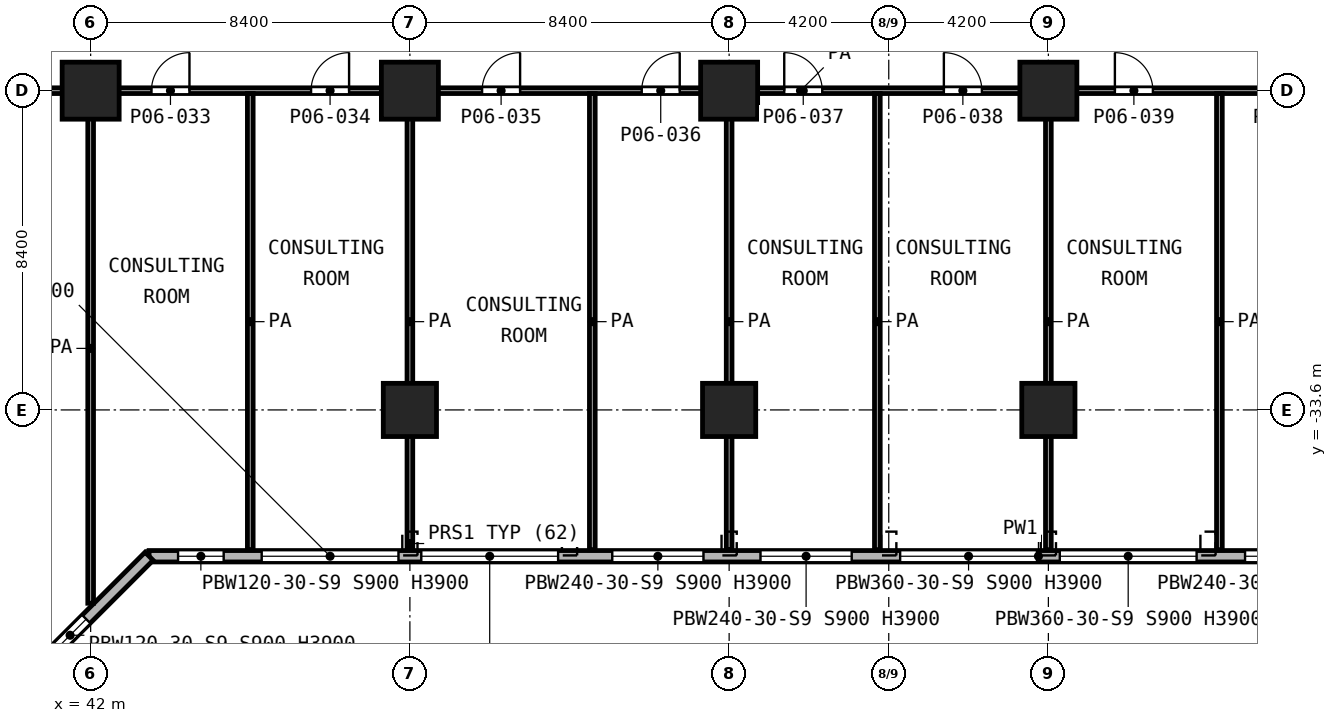
"""IFC4 building model, lengths in metres.
Left out: names, types, materials, properties, quantities, classifications, styles, units other than length and angle.
Written with IfcOpenShell. Run it as: python <this file> out.ifc"""

import sys

from ifc_helpers import new_model, si_unit, direction, frame, frame_2d, origin, origin_2d, place, context, subcontext, project, spatial, rectangle, extrude, element, fill, save


model = new_model("IFC4")
c1 = context("Model", 3, precision=1e-05, world=origin(), true_north=direction((0.0, 1.0)))
c2 = subcontext(c1, "Body", "Model", "MODEL_VIEW")
j1 = project(units=[si_unit("LENGTHUNIT", "METRE"), si_unit("PLANEANGLEUNIT", "RADIAN")], contexts=[c1])
p1 = place(None, origin())
s1 = spatial("IfcSite", under=j1, at=p1, CompositionType="ELEMENT")
p2 = place(p1, origin())
s2 = spatial("IfcBuilding", under=s1, at=p2, CompositionType="ELEMENT")
p3 = place(p2, frame((0.0, 0.0, 29.0)))
s3 = spatial("IfcBuildingStorey", under=s2, at=p3, CompositionType="ELEMENT", Elevation=29.0)
for number, where, z_axis, x_axis in (
    (1, (42.0, -25.2, 0.0), (0.0, 0.0, 1.0), (1.0, 0.0, 0.0)),
    (2, (50.4, -25.2, 0.0), (0.0, 0.0, 1.0), (1.0, 0.0, 0.0)),
    (3, (58.8, -25.2, 0.0), (0.0, 0.0, 1.0), (1.0, 0.0, 0.0)),
    (4, (67.2, -25.2, 0.0), (0.0, 0.0, 1.0), (1.0, 0.0, 0.0)),
):
    element("IfcColumn", number, at=place(p3, frame(where, z_axis=z_axis, x_axis=x_axis)), inside=s3, PredefinedType="COLUMN", context=c2, shape_type="SweptSolid", body=[
        extrude(rectangle(XDim=1.5, YDim=1.5, at=origin_2d()), origin(), (0.0, 0.0, 1.0), 5.2),
    ])
for number, where, z_axis, x_axis in (
    (5, (50.4, -33.6, 0.0), (0.0, 0.0, 1.0), (1.0, 0.0, 0.0)),
    (6, (58.8, -33.6, 0.0), (0.0, 0.0, 1.0), (1.0, 0.0, 0.0)),
    (7, (67.2, -33.6, 0.0), (0.0, 0.0, 1.0), (1.0, 0.0, 0.0)),
):
    element("IfcColumn", number, at=place(p3, frame(where, z_axis=z_axis, x_axis=x_axis)), inside=s3, PredefinedType="COLUMN", context=c2, shape_type="SweptSolid", body=[
        extrude(rectangle(XDim=1.4, YDim=1.4, at=origin_2d()), origin(), (0.0, 0.0, 1.0), 5.2),
    ])
p4 = place(p3, frame((37.45, -43.538, 0.0), z_axis=(0.0, 0.0, 1.0), x_axis=(0.707106781187, 0.707106781187, 0.0)))
e8 = element("IfcWall", 8, at=p4, inside=s3, PredefinedType="SOLIDWALL", context=c2, shape_type="SweptSolid", body=[
    extrude(rectangle(XDim=8.61, YDim=0.3, at=frame_2d((4.305, 0.0))), origin(), (0.0, 0.0, 1.0), 4.7),
])
p5 = place(p4, frame((0.651, 0.0, 0.9)))
e9 = element("IfcOpeningElement", 9, at=p5, cuts=e8, PredefinedType="OPENING", context=c2, shape_type="SweptSolid", body=[
    extrude(rectangle(XDim=2.4, YDim=3.0, at=frame_2d((1.2, 1.5))), frame((0.0, 0.16, 0.0), z_axis=(0.0, -1.0, 0.0), x_axis=(1.0, 0.0, 0.0)), (0.0, 0.0, 1.0), 0.32),
])
p6 = place(p4, frame((5.07, 0.0, 0.9)))
e10 = element("IfcOpeningElement", 10, at=p6, cuts=e8, PredefinedType="OPENING", context=c2, shape_type="SweptSolid", body=[
    extrude(rectangle(XDim=1.2, YDim=3.0, at=frame_2d((0.6, 1.5))), frame((0.0, 0.16, 0.0), z_axis=(0.0, -1.0, 0.0), x_axis=(1.0, 0.0, 0.0)), (0.0, 0.0, 1.0), 0.32),
])
p7 = place(p3, frame((43.538, -37.45, 0.0), z_axis=(0.0, 0.0, 1.0), x_axis=(1.0, 0.0, 0.0)))
e11 = element("IfcWall", 11, at=p7, inside=s3, PredefinedType="SOLIDWALL", context=c2, shape_type="SweptSolid", body=[
    extrude(rectangle(XDim=46.8, YDim=0.3, at=frame_2d((23.4, 0.0))), origin(), (0.0, 0.0, 1.0), 4.7),
])
p8 = place(p7, frame((0.762, 0.0, 0.9)))
e12 = element("IfcOpeningElement", 12, at=p8, cuts=e11, PredefinedType="OPENING", context=c2, shape_type="SweptSolid", body=[
    extrude(rectangle(XDim=1.2, YDim=3.0, at=frame_2d((0.6, 1.5))), frame((0.0, 0.16, 0.0), z_axis=(0.0, -1.0, 0.0), x_axis=(1.0, 0.0, 0.0)), (0.0, 0.0, 1.0), 0.32),
])
p9 = place(p7, frame((2.962, 0.0, 0.9)))
e13 = element("IfcOpeningElement", 13, at=p9, cuts=e11, PredefinedType="OPENING", context=c2, shape_type="SweptSolid", body=[
    extrude(rectangle(XDim=3.6, YDim=3.0, at=frame_2d((1.8, 1.5))), frame((0.0, 0.16, 0.0), z_axis=(0.0, -1.0, 0.0), x_axis=(1.0, 0.0, 0.0)), (0.0, 0.0, 1.0), 0.32),
])
p10 = place(p7, frame((7.162, 0.0, 0.9)))
e14 = element("IfcOpeningElement", 14, at=p10, cuts=e11, PredefinedType="OPENING", context=c2, shape_type="SweptSolid", body=[
    extrude(rectangle(XDim=3.6, YDim=3.0, at=frame_2d((1.8, 1.5))), frame((0.0, 0.16, 0.0), z_axis=(0.0, -1.0, 0.0), x_axis=(1.0, 0.0, 0.0)), (0.0, 0.0, 1.0), 0.32),
])
p11 = place(p7, frame((12.187, 0.0, 0.9)))
e15 = element("IfcOpeningElement", 15, at=p11, cuts=e11, PredefinedType="OPENING", context=c2, shape_type="SweptSolid", body=[
    extrude(rectangle(XDim=2.4, YDim=3.0, at=frame_2d((1.2, 1.5))), frame((0.0, 0.16, 0.0), z_axis=(0.0, -1.0, 0.0), x_axis=(1.0, 0.0, 0.0)), (0.0, 0.0, 1.0), 0.32),
])
p12 = place(p7, frame((16.087, 0.0, 0.9)))
e16 = element("IfcOpeningElement", 16, at=p12, cuts=e11, PredefinedType="OPENING", context=c2, shape_type="SweptSolid", body=[
    extrude(rectangle(XDim=2.4, YDim=3.0, at=frame_2d((1.2, 1.5))), frame((0.0, 0.16, 0.0), z_axis=(0.0, -1.0, 0.0), x_axis=(1.0, 0.0, 0.0)), (0.0, 0.0, 1.0), 0.32),
])
p13 = place(p7, frame((19.762, 0.0, 0.9)))
e17 = element("IfcOpeningElement", 17, at=p13, cuts=e11, PredefinedType="OPENING", context=c2, shape_type="SweptSolid", body=[
    extrude(rectangle(XDim=3.6, YDim=3.0, at=frame_2d((1.8, 1.5))), frame((0.0, 0.16, 0.0), z_axis=(0.0, -1.0, 0.0), x_axis=(1.0, 0.0, 0.0)), (0.0, 0.0, 1.0), 0.32),
])
p14 = place(p7, frame((23.962, 0.0, 0.9)))
e18 = element("IfcOpeningElement", 18, at=p14, cuts=e11, PredefinedType="OPENING", context=c2, shape_type="SweptSolid", body=[
    extrude(rectangle(XDim=3.6, YDim=3.0, at=frame_2d((1.8, 1.5))), frame((0.0, 0.16, 0.0), z_axis=(0.0, -1.0, 0.0), x_axis=(1.0, 0.0, 0.0)), (0.0, 0.0, 1.0), 0.32),
])
p15 = place(p7, frame((28.837, 0.0, 0.9)))
e19 = element("IfcOpeningElement", 19, at=p15, cuts=e11, PredefinedType="OPENING", context=c2, shape_type="SweptSolid", body=[
    extrude(rectangle(XDim=2.4, YDim=3.0, at=frame_2d((1.2, 1.5))), frame((0.0, 0.16, 0.0), z_axis=(0.0, -1.0, 0.0), x_axis=(1.0, 0.0, 0.0)), (0.0, 0.0, 1.0), 0.32),
])
p16 = place(p7, frame((32.737, 0.0, 0.9)))
e20 = element("IfcOpeningElement", 20, at=p16, cuts=e11, PredefinedType="OPENING", context=c2, shape_type="SweptSolid", body=[
    extrude(rectangle(XDim=2.4, YDim=3.0, at=frame_2d((1.2, 1.5))), frame((0.0, 0.16, 0.0), z_axis=(0.0, -1.0, 0.0), x_axis=(1.0, 0.0, 0.0)), (0.0, 0.0, 1.0), 0.32),
])
p17 = place(p7, frame((36.562, 0.0, 0.9)))
e21 = element("IfcOpeningElement", 21, at=p17, cuts=e11, PredefinedType="OPENING", context=c2, shape_type="SweptSolid", body=[
    extrude(rectangle(XDim=3.6, YDim=3.0, at=frame_2d((1.8, 1.5))), frame((0.0, 0.16, 0.0), z_axis=(0.0, -1.0, 0.0), x_axis=(1.0, 0.0, 0.0)), (0.0, 0.0, 1.0), 0.32),
])
p18 = place(p7, frame((40.762, 0.0, 0.9)))
e22 = element("IfcOpeningElement", 22, at=p18, cuts=e11, PredefinedType="OPENING", context=c2, shape_type="SweptSolid", body=[
    extrude(rectangle(XDim=3.6, YDim=3.0, at=frame_2d((1.8, 1.5))), frame((0.0, 0.16, 0.0), z_axis=(0.0, -1.0, 0.0), x_axis=(1.0, 0.0, 0.0)), (0.0, 0.0, 1.0), 0.32),
])
p19 = place(p7, frame((45.162, 0.0, 0.9)))
e23 = element("IfcOpeningElement", 23, at=p19, cuts=e11, PredefinedType="OPENING", context=c2, shape_type="SweptSolid", body=[
    extrude(rectangle(XDim=1.2, YDim=3.0, at=frame_2d((0.6, 1.5))), frame((0.0, 0.16, 0.0), z_axis=(0.0, -1.0, 0.0), x_axis=(1.0, 0.0, 0.0)), (0.0, 0.0, 1.0), 0.32),
])
p20 = place(p3, frame((25.275, -25.2, 0.0), z_axis=(0.0, 0.0, 1.0), x_axis=(1.0, 0.0, 0.0)))
e24 = element("IfcWall", 24, at=p20, inside=s3, PredefinedType="PARTITIONING", context=c2, shape_type="SweptSolid", body=[
    extrude(rectangle(XDim=70.805, YDim=0.15, at=frame_2d((35.403, 0.0))), origin(), (0.0, 0.0, 1.0), 4.7),
])
p21 = place(p20, frame((18.325, 0.0, 0.0)))
e25 = element("IfcOpeningElement", 25, at=p21, cuts=e24, PredefinedType="OPENING", context=c2, shape_type="SweptSolid", body=[
    extrude(rectangle(XDim=1.0, YDim=2.1, at=frame_2d((0.5, 1.05))), frame((0.0, 0.085, 0.0), z_axis=(0.0, -1.0, 0.0), x_axis=(1.0, 0.0, 0.0)), (0.0, 0.0, 1.0), 0.17),
])
p22 = place(p20, frame((22.525, 0.0, 0.0)))
e26 = element("IfcOpeningElement", 26, at=p22, cuts=e24, PredefinedType="OPENING", context=c2, shape_type="SweptSolid", body=[
    extrude(rectangle(XDim=1.0, YDim=2.1, at=frame_2d((0.5, 1.05))), frame((0.0, 0.085, 0.0), z_axis=(0.0, -1.0, 0.0), x_axis=(1.0, 0.0, 0.0)), (0.0, 0.0, 1.0), 0.17),
])
p23 = place(p20, frame((27.025, 0.0, 0.0)))
e27 = element("IfcOpeningElement", 27, at=p23, cuts=e24, PredefinedType="OPENING", context=c2, shape_type="SweptSolid", body=[
    extrude(rectangle(XDim=1.0, YDim=2.1, at=frame_2d((0.5, 1.05))), frame((0.0, 0.085, 0.0), z_axis=(0.0, -1.0, 0.0), x_axis=(1.0, 0.0, 0.0)), (0.0, 0.0, 1.0), 0.17),
])
p24 = place(p20, frame((31.225, 0.0, 0.0)))
e28 = element("IfcOpeningElement", 28, at=p24, cuts=e24, PredefinedType="OPENING", context=c2, shape_type="SweptSolid", body=[
    extrude(rectangle(XDim=1.0, YDim=2.1, at=frame_2d((0.5, 1.05))), frame((0.0, 0.085, 0.0), z_axis=(0.0, -1.0, 0.0), x_axis=(1.0, 0.0, 0.0)), (0.0, 0.0, 1.0), 0.17),
])
p25 = place(p20, frame((34.975, 0.0, 0.0)))
e29 = element("IfcOpeningElement", 29, at=p25, cuts=e24, PredefinedType="OPENING", context=c2, shape_type="SweptSolid", body=[
    extrude(rectangle(XDim=1.0, YDim=2.1, at=frame_2d((0.5, 1.05))), frame((0.0, 0.085, 0.0), z_axis=(0.0, -1.0, 0.0), x_axis=(1.0, 0.0, 0.0)), (0.0, 0.0, 1.0), 0.17),
])
p26 = place(p20, frame((39.175, 0.0, 0.0)))
e30 = element("IfcOpeningElement", 30, at=p26, cuts=e24, PredefinedType="OPENING", context=c2, shape_type="SweptSolid", body=[
    extrude(rectangle(XDim=1.0, YDim=2.1, at=frame_2d((0.5, 1.05))), frame((0.0, 0.085, 0.0), z_axis=(0.0, -1.0, 0.0), x_axis=(1.0, 0.0, 0.0)), (0.0, 0.0, 1.0), 0.17),
])
p27 = place(p20, frame((43.675, 0.0, 0.0)))
e31 = element("IfcOpeningElement", 31, at=p27, cuts=e24, PredefinedType="OPENING", context=c2, shape_type="SweptSolid", body=[
    extrude(rectangle(XDim=1.0, YDim=2.1, at=frame_2d((0.5, 1.05))), frame((0.0, 0.085, 0.0), z_axis=(0.0, -1.0, 0.0), x_axis=(1.0, 0.0, 0.0)), (0.0, 0.0, 1.0), 0.17),
])
p28 = place(p20, frame((47.875, 0.0, 0.0)))
e32 = element("IfcOpeningElement", 32, at=p28, cuts=e24, PredefinedType="OPENING", context=c2, shape_type="SweptSolid", body=[
    extrude(rectangle(XDim=1.0, YDim=2.1, at=frame_2d((0.5, 1.05))), frame((0.0, 0.085, 0.0), z_axis=(0.0, -1.0, 0.0), x_axis=(1.0, 0.0, 0.0)), (0.0, 0.0, 1.0), 0.17),
])
p29 = place(p20, frame((51.625, 0.0, 0.0)))
e33 = element("IfcOpeningElement", 33, at=p29, cuts=e24, PredefinedType="OPENING", context=c2, shape_type="SweptSolid", body=[
    extrude(rectangle(XDim=1.0, YDim=2.1, at=frame_2d((0.5, 1.05))), frame((0.0, 0.085, 0.0), z_axis=(0.0, -1.0, 0.0), x_axis=(1.0, 0.0, 0.0)), (0.0, 0.0, 1.0), 0.17),
])
p30 = place(p20, frame((55.825, 0.0, 0.0)))
e34 = element("IfcOpeningElement", 34, at=p30, cuts=e24, PredefinedType="OPENING", context=c2, shape_type="SweptSolid", body=[
    extrude(rectangle(XDim=1.0, YDim=2.1, at=frame_2d((0.5, 1.05))), frame((0.0, 0.085, 0.0), z_axis=(0.0, -1.0, 0.0), x_axis=(1.0, 0.0, 0.0)), (0.0, 0.0, 1.0), 0.17),
])
p31 = place(p20, frame((60.325, 0.0, 0.0)))
e35 = element("IfcOpeningElement", 35, at=p31, cuts=e24, PredefinedType="OPENING", context=c2, shape_type="SweptSolid", body=[
    extrude(rectangle(XDim=1.0, YDim=2.1, at=frame_2d((0.5, 1.05))), frame((0.0, 0.085, 0.0), z_axis=(0.0, -1.0, 0.0), x_axis=(1.0, 0.0, 0.0)), (0.0, 0.0, 1.0), 0.17),
])
p32 = place(p20, frame((66.525, 0.0, 0.0)))
e36 = element("IfcOpeningElement", 36, at=p32, cuts=e24, PredefinedType="OPENING", context=c2, shape_type="SweptSolid", body=[
    extrude(rectangle(XDim=1.0, YDim=2.1, at=frame_2d((0.5, 1.05))), frame((0.0, 0.085, 0.0), z_axis=(0.0, -1.0, 0.0), x_axis=(1.0, 0.0, 0.0)), (0.0, 0.0, 1.0), 0.17),
])
p33 = place(p20, frame((9.125, 0.0, 0.0)))
e37 = element("IfcOpeningElement", 37, at=p33, cuts=e24, PredefinedType="OPENING", context=c2, shape_type="SweptSolid", body=[
    extrude(rectangle(XDim=1.5, YDim=2.1, at=frame_2d((0.75, 1.05))), frame((0.0, 0.085, 0.0), z_axis=(0.0, -1.0, 0.0), x_axis=(1.0, 0.0, 0.0)), (0.0, 0.0, 1.0), 0.17),
])
p34 = place(p3, frame((42.0, -38.687, 0.0), z_axis=(0.0, 0.0, 1.0), x_axis=(0.0, 1.0, 0.0)))
e38 = element("IfcWall", 38, at=p34, inside=s3, PredefinedType="PARTITIONING", context=c2, shape_type="SweptSolid", body=[
    extrude(rectangle(XDim=13.412, YDim=0.15, at=frame_2d((6.706, 0.0))), origin(), (0.0, 0.0, 1.0), 4.7),
])
for number, where, z_axis, x_axis in (
    (39, (46.2, -37.28, 0.0), (0.0, 0.0, 1.0), (0.0, 1.0, 0.0)),
    (40, (50.4, -37.28, 0.0), (0.0, 0.0, 1.0), (0.0, 1.0, 0.0)),
    (41, (55.2, -37.28, 0.0), (0.0, 0.0, 1.0), (0.0, 1.0, 0.0)),
    (42, (58.8, -37.28, 0.0), (0.0, 0.0, 1.0), (0.0, 1.0, 0.0)),
    (43, (62.7, -37.28, 0.0), (0.0, 0.0, 1.0), (0.0, 1.0, 0.0)),
    (44, (67.2, -37.28, 0.0), (0.0, 0.0, 1.0), (0.0, 1.0, 0.0)),
    (45, (71.7, -37.28, 0.0), (0.0, 0.0, 1.0), (0.0, 1.0, 0.0)),
):
    element("IfcWall", number, at=place(p3, frame(where, z_axis=z_axis, x_axis=x_axis)), inside=s3, PredefinedType="PARTITIONING", context=c2, shape_type="SweptSolid", body=[
        extrude(rectangle(XDim=12.005, YDim=0.15, at=frame_2d((6.002, 0.0))), origin(), (0.0, 0.0, 1.0), 4.7),
    ])
p35 = place(p6, origin())
e46 = element("IfcWindow", 46, at=p35, inside=s3, PartitioningType="SINGLE_PANEL", PredefinedType="WINDOW", context=c2, shape_type="SweptSolid", body=[
    extrude(rectangle(XDim=1.2, YDim=3.0, at=frame_2d((0.6, 1.5))), frame((0.0, 0.03, 0.0), z_axis=(0.0, -1.0, 0.0), x_axis=(1.0, 0.0, 0.0)), (0.0, 0.0, 1.0), 0.06),
])
fill(e10, e46)
p36 = place(p8, origin())
e47 = element("IfcWindow", 47, at=p36, inside=s3, PartitioningType="SINGLE_PANEL", PredefinedType="WINDOW", context=c2, shape_type="SweptSolid", body=[
    extrude(rectangle(XDim=1.2, YDim=3.0, at=frame_2d((0.6, 1.5))), frame((0.0, 0.03, 0.0), z_axis=(0.0, -1.0, 0.0), x_axis=(1.0, 0.0, 0.0)), (0.0, 0.0, 1.0), 0.06),
])
fill(e12, e47)
p37 = place(p9, origin())
e48 = element("IfcWindow", 48, at=p37, inside=s3, PartitioningType="SINGLE_PANEL", PredefinedType="WINDOW", context=c2, shape_type="SweptSolid", body=[
    extrude(rectangle(XDim=3.6, YDim=3.0, at=frame_2d((1.8, 1.5))), frame((0.0, 0.03, 0.0), z_axis=(0.0, -1.0, 0.0), x_axis=(1.0, 0.0, 0.0)), (0.0, 0.0, 1.0), 0.06),
])
fill(e13, e48)
p38 = place(p10, origin())
e49 = element("IfcWindow", 49, at=p38, inside=s3, PartitioningType="SINGLE_PANEL", PredefinedType="WINDOW", context=c2, shape_type="SweptSolid", body=[
    extrude(rectangle(XDim=3.6, YDim=3.0, at=frame_2d((1.8, 1.5))), frame((0.0, 0.03, 0.0), z_axis=(0.0, -1.0, 0.0), x_axis=(1.0, 0.0, 0.0)), (0.0, 0.0, 1.0), 0.06),
])
fill(e14, e49)
p39 = place(p11, origin())
e50 = element("IfcWindow", 50, at=p39, inside=s3, PartitioningType="SINGLE_PANEL", PredefinedType="WINDOW", context=c2, shape_type="SweptSolid", body=[
    extrude(rectangle(XDim=2.4, YDim=3.0, at=frame_2d((1.2, 1.5))), frame((0.0, 0.03, 0.0), z_axis=(0.0, -1.0, 0.0), x_axis=(1.0, 0.0, 0.0)), (0.0, 0.0, 1.0), 0.06),
])
fill(e15, e50)
p40 = place(p12, origin())
e51 = element("IfcWindow", 51, at=p40, inside=s3, PartitioningType="SINGLE_PANEL", PredefinedType="WINDOW", context=c2, shape_type="SweptSolid", body=[
    extrude(rectangle(XDim=2.4, YDim=3.0, at=frame_2d((1.2, 1.5))), frame((0.0, 0.03, 0.0), z_axis=(0.0, -1.0, 0.0), x_axis=(1.0, 0.0, 0.0)), (0.0, 0.0, 1.0), 0.06),
])
fill(e16, e51)
p41 = place(p13, origin())
e52 = element("IfcWindow", 52, at=p41, inside=s3, PartitioningType="SINGLE_PANEL", PredefinedType="WINDOW", context=c2, shape_type="SweptSolid", body=[
    extrude(rectangle(XDim=3.6, YDim=3.0, at=frame_2d((1.8, 1.5))), frame((0.0, 0.03, 0.0), z_axis=(0.0, -1.0, 0.0), x_axis=(1.0, 0.0, 0.0)), (0.0, 0.0, 1.0), 0.06),
])
fill(e17, e52)
p42 = place(p14, origin())
e53 = element("IfcWindow", 53, at=p42, inside=s3, PartitioningType="SINGLE_PANEL", PredefinedType="WINDOW", context=c2, shape_type="SweptSolid", body=[
    extrude(rectangle(XDim=3.6, YDim=3.0, at=frame_2d((1.8, 1.5))), frame((0.0, 0.03, 0.0), z_axis=(0.0, -1.0, 0.0), x_axis=(1.0, 0.0, 0.0)), (0.0, 0.0, 1.0), 0.06),
])
fill(e18, e53)
p43 = place(p15, origin())
e54 = element("IfcWindow", 54, at=p43, inside=s3, PartitioningType="SINGLE_PANEL", PredefinedType="WINDOW", context=c2, shape_type="SweptSolid", body=[
    extrude(rectangle(XDim=2.4, YDim=3.0, at=frame_2d((1.2, 1.5))), frame((0.0, 0.03, 0.0), z_axis=(0.0, -1.0, 0.0), x_axis=(1.0, 0.0, 0.0)), (0.0, 0.0, 1.0), 0.06),
])
fill(e19, e54)
p44 = place(p21, origin())
e55 = element("IfcDoor", 55, at=p44, inside=s3, OperationType="SINGLE_SWING_RIGHT", PredefinedType="DOOR", context=c2, shape_type="SweptSolid", body=[
    extrude(rectangle(XDim=1.0, YDim=2.1, at=frame_2d((0.5, 1.05))), frame((0.0, 0.025, 0.0), z_axis=(0.0, -1.0, 0.0), x_axis=(1.0, 0.0, 0.0)), (0.0, 0.0, 1.0), 0.05),
])
fill(e25, e55)
p45 = place(p22, origin())
e56 = element("IfcDoor", 56, at=p45, inside=s3, OperationType="SINGLE_SWING_RIGHT", PredefinedType="DOOR", context=c2, shape_type="SweptSolid", body=[
    extrude(rectangle(XDim=1.0, YDim=2.1, at=frame_2d((0.5, 1.05))), frame((0.0, 0.025, 0.0), z_axis=(0.0, -1.0, 0.0), x_axis=(1.0, 0.0, 0.0)), (0.0, 0.0, 1.0), 0.05),
])
fill(e26, e56)
p46 = place(p23, origin())
e57 = element("IfcDoor", 57, at=p46, inside=s3, OperationType="SINGLE_SWING_RIGHT", PredefinedType="DOOR", context=c2, shape_type="SweptSolid", body=[
    extrude(rectangle(XDim=1.0, YDim=2.1, at=frame_2d((0.5, 1.05))), frame((0.0, 0.025, 0.0), z_axis=(0.0, -1.0, 0.0), x_axis=(1.0, 0.0, 0.0)), (0.0, 0.0, 1.0), 0.05),
])
fill(e27, e57)
p47 = place(p24, origin())
e58 = element("IfcDoor", 58, at=p47, inside=s3, OperationType="SINGLE_SWING_RIGHT", PredefinedType="DOOR", context=c2, shape_type="SweptSolid", body=[
    extrude(rectangle(XDim=1.0, YDim=2.1, at=frame_2d((0.5, 1.05))), frame((0.0, 0.025, 0.0), z_axis=(0.0, -1.0, 0.0), x_axis=(1.0, 0.0, 0.0)), (0.0, 0.0, 1.0), 0.05),
])
fill(e28, e58)
p48 = place(p25, origin())
e59 = element("IfcDoor", 59, at=p48, inside=s3, OperationType="SINGLE_SWING_LEFT", PredefinedType="DOOR", context=c2, shape_type="SweptSolid", body=[
    extrude(rectangle(XDim=1.0, YDim=2.1, at=frame_2d((0.5, 1.05))), frame((0.0, 0.025, 0.0), z_axis=(0.0, -1.0, 0.0), x_axis=(1.0, 0.0, 0.0)), (0.0, 0.0, 1.0), 0.05),
])
fill(e29, e59)
p49 = place(p26, origin())
e60 = element("IfcDoor", 60, at=p49, inside=s3, OperationType="SINGLE_SWING_LEFT", PredefinedType="DOOR", context=c2, shape_type="SweptSolid", body=[
    extrude(rectangle(XDim=1.0, YDim=2.1, at=frame_2d((0.5, 1.05))), frame((0.0, 0.025, 0.0), z_axis=(0.0, -1.0, 0.0), x_axis=(1.0, 0.0, 0.0)), (0.0, 0.0, 1.0), 0.05),
])
fill(e30, e60)
p50 = place(p27, origin())
e61 = element("IfcDoor", 61, at=p50, inside=s3, OperationType="SINGLE_SWING_LEFT", PredefinedType="DOOR", context=c2, shape_type="SweptSolid", body=[
    extrude(rectangle(XDim=1.0, YDim=2.1, at=frame_2d((0.5, 1.05))), frame((0.0, 0.025, 0.0), z_axis=(0.0, -1.0, 0.0), x_axis=(1.0, 0.0, 0.0)), (0.0, 0.0, 1.0), 0.05),
])
fill(e31, e61)
save(model, sys.argv[1])
